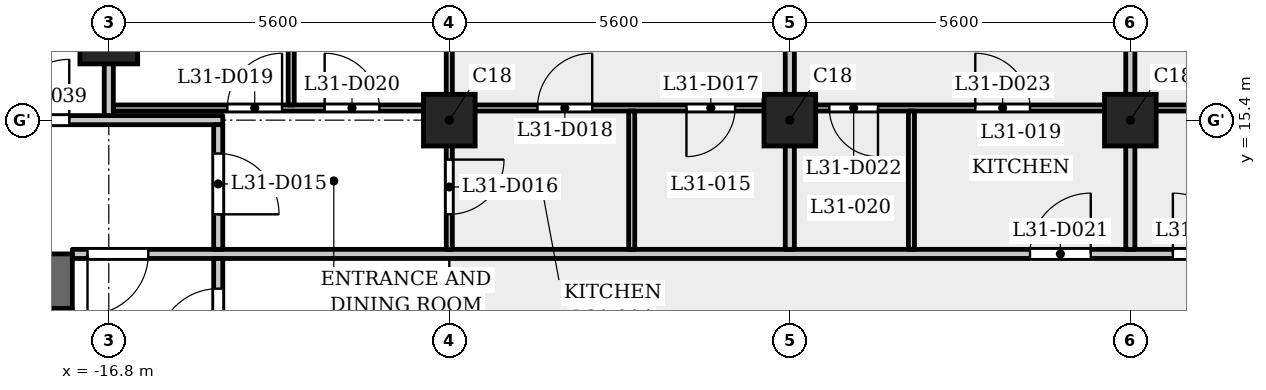
"""IFC4 building model, lengths in metres.
Left out: names, types, materials, properties, quantities, classifications, styles, units other than length and angle.
Written with IfcOpenShell. Run it as: python <this file> out.ifc"""

import sys

from ifc_helpers import new_model, si_unit, direction, frame, frame_2d, origin, origin_2d, place, context, subcontext, project, spatial, rectangle, extrude, element, fill, save


model = new_model("IFC4")
c1 = context("Model", 3, precision=1e-05, world=origin(), true_north=direction((0.0, 1.0)))
c2 = subcontext(c1, "Body", "Model", "MODEL_VIEW")
j1 = project(units=[si_unit("LENGTHUNIT", "METRE"), si_unit("PLANEANGLEUNIT", "RADIAN")], contexts=[c1])
p1 = place(None, origin())
s1 = spatial("IfcSite", under=j1, at=p1, CompositionType="ELEMENT")
p2 = place(p1, origin())
s2 = spatial("IfcBuilding", under=s1, at=p2, CompositionType="ELEMENT")
p3 = place(p2, frame((0.0, 0.0, 121.8)))
s3 = spatial("IfcBuildingStorey", under=s2, at=p3, CompositionType="ELEMENT", Elevation=121.8)
p4 = place(p3, frame((-16.8, 16.8, 0.0), z_axis=(0.0, 0.0, 1.0), x_axis=(1.0, 0.0, 0.0)))
e1 = element("IfcColumn", 1, at=p4, inside=s3, PredefinedType="COLUMN", context=c2, shape_type="SweptSolid", body=[
    extrude(rectangle(XDim=0.95, YDim=0.95, at=origin_2d()), origin(), (0.0, 0.0, 1.0), 3.5),
])
for number, where, z_axis, x_axis in (
    (2, (-11.2, 15.4, 0.0), (0.0, 0.0, 1.0), (1.0, 0.0, 0.0)),
    (3, (-5.6, 15.4, 0.0), (0.0, 0.0, 1.0), (1.0, 0.0, 0.0)),
    (4, (0.0, 15.4, 0.0), (0.0, 0.0, 1.0), (1.0, 0.0, 0.0)),
):
    element("IfcColumn", number, at=place(p3, frame(where, z_axis=z_axis, x_axis=x_axis)), inside=s3, PredefinedType="COLUMN", context=c2, shape_type="SweptSolid", body=[
        extrude(rectangle(XDim=0.85, YDim=0.85, at=origin_2d()), origin(), (0.0, 0.0, 1.0), 3.5),
    ])
p5 = place(p3, frame((-17.4, 12.75, 0.0), z_axis=(0.0, 0.0, 1.0), x_axis=(-1.0, 0.0, 0.0)))
e5 = element("IfcWall", 5, at=p5, inside=s3, PredefinedType="SHEAR", context=c2, shape_type="SweptSolid", body=[
    extrude(rectangle(XDim=10.4, YDim=0.9, at=frame_2d((5.2, 0.0))), origin(), (0.0, 0.0, 1.0), 3.15),
])
p6 = place(p3, frame((-17.6, -12.3, 0.0), z_axis=(0.0, 0.0, 1.0), x_axis=(0.0, 1.0, 0.0)))
e6 = element("IfcWall", 6, at=p6, inside=s3, PredefinedType="SHEAR", context=c2, shape_type="SweptSolid", body=[
    extrude(rectangle(XDim=24.6, YDim=0.4, at=frame_2d((12.3, 0.0))), origin(), (0.0, 0.0, 1.0), 3.15),
])
p7 = place(p6, frame((6.0, 0.0, 0.0)))
e7 = element("IfcOpeningElement", 7, at=p7, cuts=e6, PredefinedType="OPENING", context=c2, shape_type="SweptSolid", body=[
    extrude(rectangle(XDim=1.1, YDim=2.1, at=frame_2d((0.55, 1.05))), frame((0.0, 0.21, 0.0), z_axis=(0.0, -1.0, 0.0), x_axis=(1.0, 0.0, 0.0)), (0.0, 0.0, 1.0), 0.42),
])
p8 = place(p6, frame((8.4, 0.0, 0.0)))
e8 = element("IfcOpeningElement", 8, at=p8, cuts=e6, PredefinedType="OPENING", context=c2, shape_type="SweptSolid", body=[
    extrude(rectangle(XDim=1.1, YDim=2.1, at=frame_2d((0.55, 1.05))), frame((0.0, 0.21, 0.0), z_axis=(0.0, -1.0, 0.0), x_axis=(1.0, 0.0, 0.0)), (0.0, 0.0, 1.0), 0.42),
])
p9 = place(p6, frame((10.8, 0.0, 0.0)))
e9 = element("IfcOpeningElement", 9, at=p9, cuts=e6, PredefinedType="OPENING", context=c2, shape_type="SweptSolid", body=[
    extrude(rectangle(XDim=1.1, YDim=2.1, at=frame_2d((0.55, 1.05))), frame((0.0, 0.21, 0.0), z_axis=(0.0, -1.0, 0.0), x_axis=(1.0, 0.0, 0.0)), (0.0, 0.0, 1.0), 0.42),
])
p10 = place(p6, frame((22.8, 0.0, 0.0)))
e10 = element("IfcOpeningElement", 10, at=p10, cuts=e6, PredefinedType="OPENING", context=c2, shape_type="SweptSolid", body=[
    extrude(rectangle(XDim=1.1, YDim=2.1, at=frame_2d((0.55, 1.05))), frame((0.0, 0.21, 0.0), z_axis=(0.0, -1.0, 0.0), x_axis=(1.0, 0.0, 0.0)), (0.0, 0.0, 1.0), 0.42),
])
p11 = place(p6, frame((0.7, 0.0, 0.0)))
e11 = element("IfcOpeningElement", 11, at=p11, cuts=e6, PredefinedType="OPENING", context=c2, shape_type="SweptSolid", body=[
    extrude(rectangle(XDim=1.1, YDim=2.1, at=frame_2d((0.55, 1.05))), frame((0.0, 0.21, 0.0), z_axis=(0.0, -1.0, 0.0), x_axis=(1.0, 0.0, 0.0)), (0.0, 0.0, 1.0), 0.42),
])
p12 = place(p6, frame((12.775, 0.0, 0.0)))
e12 = element("IfcOpeningElement", 12, at=p12, cuts=e6, PredefinedType="OPENING", context=c2, shape_type="SweptSolid", body=[
    extrude(rectangle(XDim=1.8, YDim=2.1, at=frame_2d((0.9, 1.05))), frame((0.0, 0.21, 0.0), z_axis=(0.0, -1.0, 0.0), x_axis=(1.0, 0.0, 0.0)), (0.0, 0.0, 1.0), 0.42),
])
p13 = place(p3, frame((-17.4, 13.2, 0.0), z_axis=(0.0, 0.0, 1.0), x_axis=(1.0, 0.0, 0.0)))
e13 = element("IfcWall", 13, at=p13, inside=s3, PredefinedType="PARTITIONING", context=c2, shape_type="SweptSolid", body=[
    extrude(rectangle(XDim=34.8, YDim=0.15, at=frame_2d((17.4, 0.0))), origin(), (0.0, 0.0, 1.0), 3.15),
])
p14 = place(p13, frame((0.25, 0.0, 0.0)))
e14 = element("IfcOpeningElement", 14, at=p14, cuts=e13, PredefinedType="OPENING", context=c2, shape_type="SweptSolid", body=[
    extrude(rectangle(XDim=1.0, YDim=2.1, at=frame_2d((0.5, 1.05))), frame((0.0, 0.085, 0.0), z_axis=(0.0, -1.0, 0.0), x_axis=(1.0, 0.0, 0.0)), (0.0, 0.0, 1.0), 0.17),
])
p15 = place(p13, frame((33.65, 0.0, 0.0)))
e15 = element("IfcOpeningElement", 15, at=p15, cuts=e13, PredefinedType="OPENING", context=c2, shape_type="SweptSolid", body=[
    extrude(rectangle(XDim=1.0, YDim=2.1, at=frame_2d((0.5, 1.05))), frame((0.0, 0.085, 0.0), z_axis=(0.0, -1.0, 0.0), x_axis=(1.0, 0.0, 0.0)), (0.0, 0.0, 1.0), 0.17),
])
p16 = place(p13, frame((15.75, 0.0, 0.0)))
e16 = element("IfcOpeningElement", 16, at=p16, cuts=e13, PredefinedType="OPENING", context=c2, shape_type="SweptSolid", body=[
    extrude(rectangle(XDim=1.0, YDim=2.1, at=frame_2d((0.5, 1.05))), frame((0.0, 0.085, 0.0), z_axis=(0.0, -1.0, 0.0), x_axis=(1.0, 0.0, 0.0)), (0.0, 0.0, 1.0), 0.17),
])
p17 = place(p13, frame((18.1, 0.0, 0.0)))
e17 = element("IfcOpeningElement", 17, at=p17, cuts=e13, PredefinedType="OPENING", context=c2, shape_type="SweptSolid", body=[
    extrude(rectangle(XDim=1.0, YDim=2.1, at=frame_2d((0.5, 1.05))), frame((0.0, 0.085, 0.0), z_axis=(0.0, -1.0, 0.0), x_axis=(1.0, 0.0, 0.0)), (0.0, 0.0, 1.0), 0.17),
])
p18 = place(p13, frame((23.55, 0.0, 0.0)))
e18 = element("IfcOpeningElement", 18, at=p18, cuts=e13, PredefinedType="OPENING", context=c2, shape_type="SweptSolid", body=[
    extrude(rectangle(XDim=1.0, YDim=2.1, at=frame_2d((0.5, 1.05))), frame((0.0, 0.085, 0.0), z_axis=(0.0, -1.0, 0.0), x_axis=(1.0, 0.0, 0.0)), (0.0, 0.0, 1.0), 0.17),
])
p19 = place(p3, frame((-27.484, 15.4, 0.0), z_axis=(0.0, 0.0, 1.0), x_axis=(1.0, 0.0, 0.0)))
e19 = element("IfcWall", 19, at=p19, inside=s3, PredefinedType="PARTITIONING", context=c2, shape_type="SweptSolid", body=[
    extrude(rectangle(XDim=12.559, YDim=0.15, at=frame_2d((6.279, 0.0))), origin(), (0.0, 0.0, 1.0), 3.15),
])
p20 = place(p19, frame((9.034, 0.0, 0.0)))
e20 = element("IfcOpeningElement", 20, at=p20, cuts=e19, PredefinedType="OPENING", context=c2, shape_type="SweptSolid", body=[
    extrude(rectangle(XDim=1.0, YDim=2.1, at=frame_2d((0.5, 1.05))), frame((0.0, 0.085, 0.0), z_axis=(0.0, -1.0, 0.0), x_axis=(1.0, 0.0, 0.0)), (0.0, 0.0, 1.0), 0.17),
])
p21 = place(p3, frame((-16.725, 15.6, 0.0), z_axis=(0.0, 0.0, 1.0), x_axis=(1.0, 0.0, 0.0)))
e21 = element("IfcWall", 21, at=p21, inside=s3, PredefinedType="PARTITIONING", context=c2, shape_type="SweptSolid", body=[
    extrude(rectangle(XDim=33.45, YDim=0.1, at=frame_2d((16.725, 0.0))), origin(), (0.0, 0.0, 1.0), 3.15),
])
p22 = place(p21, frame((9.425, 0.0, 0.0)))
e22 = element("IfcOpeningElement", 22, at=p22, cuts=e21, PredefinedType="OPENING", context=c2, shape_type="SweptSolid", body=[
    extrude(rectangle(XDim=0.8, YDim=2.1, at=frame_2d((0.4, 1.05))), frame((0.0, 0.06, 0.0), z_axis=(0.0, -1.0, 0.0), x_axis=(1.0, 0.0, 0.0)), (0.0, 0.0, 1.0), 0.12),
])
p23 = place(p21, frame((6.975, 0.0, 0.0)))
e23 = element("IfcOpeningElement", 23, at=p23, cuts=e21, PredefinedType="OPENING", context=c2, shape_type="SweptSolid", body=[
    extrude(rectangle(XDim=0.9, YDim=2.1, at=frame_2d((0.45, 1.05))), frame((0.0, 0.06, 0.0), z_axis=(0.0, -1.0, 0.0), x_axis=(1.0, 0.0, 0.0)), (0.0, 0.0, 1.0), 0.12),
])
p24 = place(p21, frame((1.875, 0.0, 0.0)))
e24 = element("IfcOpeningElement", 24, at=p24, cuts=e21, PredefinedType="OPENING", context=c2, shape_type="SweptSolid", body=[
    extrude(rectangle(XDim=0.9, YDim=2.1, at=frame_2d((0.45, 1.05))), frame((0.0, 0.06, 0.0), z_axis=(0.0, -1.0, 0.0), x_axis=(1.0, 0.0, 0.0)), (0.0, 0.0, 1.0), 0.12),
])
p25 = place(p21, frame((3.475, 0.0, 0.0)))
e25 = element("IfcOpeningElement", 25, at=p25, cuts=e21, PredefinedType="OPENING", context=c2, shape_type="SweptSolid", body=[
    extrude(rectangle(XDim=0.9, YDim=2.1, at=frame_2d((0.45, 1.05))), frame((0.0, 0.06, 0.0), z_axis=(0.0, -1.0, 0.0), x_axis=(1.0, 0.0, 0.0)), (0.0, 0.0, 1.0), 0.12),
])
p26 = place(p21, frame((11.775, 0.0, 0.0)))
e26 = element("IfcOpeningElement", 26, at=p26, cuts=e21, PredefinedType="OPENING", context=c2, shape_type="SweptSolid", body=[
    extrude(rectangle(XDim=0.8, YDim=2.1, at=frame_2d((0.4, 1.05))), frame((0.0, 0.06, 0.0), z_axis=(0.0, -1.0, 0.0), x_axis=(1.0, 0.0, 0.0)), (0.0, 0.0, 1.0), 0.12),
])
p27 = place(p21, frame((14.175, 0.0, 0.0)))
e27 = element("IfcOpeningElement", 27, at=p27, cuts=e21, PredefinedType="OPENING", context=c2, shape_type="SweptSolid", body=[
    extrude(rectangle(XDim=0.9, YDim=2.1, at=frame_2d((0.45, 1.05))), frame((0.0, 0.06, 0.0), z_axis=(0.0, -1.0, 0.0), x_axis=(1.0, 0.0, 0.0)), (0.0, 0.0, 1.0), 0.12),
])
p28 = place(p21, frame((20.725, 0.0, 0.0)))
e28 = element("IfcOpeningElement", 28, at=p28, cuts=e21, PredefinedType="OPENING", context=c2, shape_type="SweptSolid", body=[
    extrude(rectangle(XDim=0.8, YDim=2.1, at=frame_2d((0.4, 1.05))), frame((0.0, 0.06, 0.0), z_axis=(0.0, -1.0, 0.0), x_axis=(1.0, 0.0, 0.0)), (0.0, 0.0, 1.0), 0.12),
])
p29 = place(p21, frame((18.375, 0.0, 0.0)))
e29 = element("IfcOpeningElement", 29, at=p29, cuts=e21, PredefinedType="OPENING", context=c2, shape_type="SweptSolid", body=[
    extrude(rectangle(XDim=0.9, YDim=2.1, at=frame_2d((0.45, 1.05))), frame((0.0, 0.06, 0.0), z_axis=(0.0, -1.0, 0.0), x_axis=(1.0, 0.0, 0.0)), (0.0, 0.0, 1.0), 0.12),
])
p30 = place(p21, frame((26.425, 0.0, 0.0)))
e30 = element("IfcOpeningElement", 30, at=p30, cuts=e21, PredefinedType="OPENING", context=c2, shape_type="SweptSolid", body=[
    extrude(rectangle(XDim=0.8, YDim=2.1, at=frame_2d((0.4, 1.05))), frame((0.0, 0.06, 0.0), z_axis=(0.0, -1.0, 0.0), x_axis=(1.0, 0.0, 0.0)), (0.0, 0.0, 1.0), 0.12),
])
p31 = place(p21, frame((23.875, 0.0, 0.0)))
e31 = element("IfcOpeningElement", 31, at=p31, cuts=e21, PredefinedType="OPENING", context=c2, shape_type="SweptSolid", body=[
    extrude(rectangle(XDim=0.9, YDim=2.1, at=frame_2d((0.45, 1.05))), frame((0.0, 0.06, 0.0), z_axis=(0.0, -1.0, 0.0), x_axis=(1.0, 0.0, 0.0)), (0.0, 0.0, 1.0), 0.12),
])
p32 = place(p21, frame((28.575, 0.0, 0.0)))
e32 = element("IfcOpeningElement", 32, at=p32, cuts=e21, PredefinedType="OPENING", context=c2, shape_type="SweptSolid", body=[
    extrude(rectangle(XDim=0.8, YDim=2.1, at=frame_2d((0.4, 1.05))), frame((0.0, 0.06, 0.0), z_axis=(0.0, -1.0, 0.0), x_axis=(1.0, 0.0, 0.0)), (0.0, 0.0, 1.0), 0.12),
])
p33 = place(p21, frame((30.725, 0.0, 0.0)))
e33 = element("IfcOpeningElement", 33, at=p33, cuts=e21, PredefinedType="OPENING", context=c2, shape_type="SweptSolid", body=[
    extrude(rectangle(XDim=0.9, YDim=2.1, at=frame_2d((0.45, 1.05))), frame((0.0, 0.06, 0.0), z_axis=(0.0, -1.0, 0.0), x_axis=(1.0, 0.0, 0.0)), (0.0, 0.0, 1.0), 0.12),
])
p34 = place(p3, frame((-16.8, 15.475, 0.0), z_axis=(0.0, 0.0, 1.0), x_axis=(0.0, 1.0, 0.0)))
e34 = element("IfcWall", 34, at=p34, inside=s3, PredefinedType="PARTITIONING", context=c2, shape_type="SweptSolid", body=[
    extrude(rectangle(XDim=7.505, YDim=0.15, at=frame_2d((3.752, 0.0))), origin(), (0.0, 0.0, 1.0), 3.15),
])
p35 = place(p3, frame((-15.0, 6.769, 0.0), z_axis=(0.0, 0.0, 1.0), x_axis=(0.0, 1.0, 0.0)))
e35 = element("IfcWall", 35, at=p35, inside=s3, PredefinedType="PARTITIONING", context=c2, shape_type="SweptSolid", body=[
    extrude(rectangle(XDim=6.356, YDim=0.15, at=frame_2d((3.178, 0.0))), origin(), (0.0, 0.0, 1.0), 3.15),
])
p36 = place(p35, frame((4.86, 0.0, 0.0)))
e36 = element("IfcOpeningElement", 36, at=p36, cuts=e35, PredefinedType="OPENING", context=c2, shape_type="SweptSolid", body=[
    extrude(rectangle(XDim=1.0, YDim=2.1, at=frame_2d((0.5, 1.05))), frame((0.0, 0.085, 0.0), z_axis=(0.0, -1.0, 0.0), x_axis=(1.0, 0.0, 0.0)), (0.0, 0.0, 1.0), 0.17),
])
p37 = place(p3, frame((-15.0, 13.275, 0.0), z_axis=(0.0, 0.0, 1.0), x_axis=(0.0, 1.0, 0.0)))
e37 = element("IfcWall", 37, at=p37, inside=s3, PredefinedType="PARTITIONING", context=c2, shape_type="SweptSolid", body=[
    extrude(rectangle(XDim=2.05, YDim=0.15, at=frame_2d((1.025, 0.0))), origin(), (0.0, 0.0, 1.0), 3.15),
])
p38 = place(p37, frame((0.576, 0.0, 0.0)))
e38 = element("IfcOpeningElement", 38, at=p38, cuts=e37, PredefinedType="OPENING", context=c2, shape_type="SweptSolid", body=[
    extrude(rectangle(XDim=1.0, YDim=2.1, at=frame_2d((0.5, 1.05))), frame((0.0, 0.085, 0.0), z_axis=(0.0, -1.0, 0.0), x_axis=(1.0, 0.0, 0.0)), (0.0, 0.0, 1.0), 0.17),
])
p39 = place(p3, frame((-13.8, 15.65, 0.0), z_axis=(0.0, 0.0, 1.0), x_axis=(0.0, 1.0, 0.0)))
e39 = element("IfcWall", 39, at=p39, inside=s3, PredefinedType="PARTITIONING", context=c2, shape_type="SweptSolid", body=[
    extrude(rectangle(XDim=6.43, YDim=0.1, at=frame_2d((3.215, 0.0))), origin(), (0.0, 0.0, 1.0), 3.15),
])
p40 = place(p3, frame((-11.2, 13.275, 0.0), z_axis=(0.0, 0.0, 1.0), x_axis=(0.0, 1.0, 0.0)))
e40 = element("IfcWall", 40, at=p40, inside=s3, PredefinedType="PARTITIONING", context=c2, shape_type="SweptSolid", body=[
    extrude(rectangle(XDim=2.275, YDim=0.1, at=frame_2d((1.138, 0.0))), origin(), (0.0, 0.0, 1.0), 3.15),
])
p41 = place(p40, frame((0.576, 0.0, 0.0)))
e41 = element("IfcOpeningElement", 41, at=p41, cuts=e40, PredefinedType="OPENING", context=c2, shape_type="SweptSolid", body=[
    extrude(rectangle(XDim=0.9, YDim=2.1, at=frame_2d((0.45, 1.05))), frame((0.0, 0.06, 0.0), z_axis=(0.0, -1.0, 0.0), x_axis=(1.0, 0.0, 0.0)), (0.0, 0.0, 1.0), 0.12),
])
p42 = place(p3, frame((-11.2, 15.65, 0.0), z_axis=(0.0, 0.0, 1.0), x_axis=(0.0, 1.0, 0.0)))
e42 = element("IfcWall", 42, at=p42, inside=s3, PredefinedType="PARTITIONING", context=c2, shape_type="SweptSolid", body=[
    extrude(rectangle(XDim=7.33, YDim=0.1, at=frame_2d((3.665, 0.0))), origin(), (0.0, 0.0, 1.0), 3.15),
])
p43 = place(p3, frame((-8.2, 13.275, 0.0), z_axis=(0.0, 0.0, 1.0), x_axis=(0.0, 1.0, 0.0)))
e43 = element("IfcWall", 43, at=p43, inside=s3, PredefinedType="PARTITIONING", context=c2, shape_type="SweptSolid", body=[
    extrude(rectangle(XDim=2.275, YDim=0.1, at=frame_2d((1.138, 0.0))), origin(), (0.0, 0.0, 1.0), 3.15),
])
p44 = place(p3, frame((-5.6, 13.275, 0.0), z_axis=(0.0, 0.0, 1.0), x_axis=(0.0, 1.0, 0.0)))
e44 = element("IfcWall", 44, at=p44, inside=s3, PredefinedType="PARTITIONING", context=c2, shape_type="SweptSolid", body=[
    extrude(rectangle(XDim=2.275, YDim=0.15, at=frame_2d((1.138, 0.0))), origin(), (0.0, 0.0, 1.0), 3.15),
])
p45 = place(p3, frame((-5.6, 15.65, 0.0), z_axis=(0.0, 0.0, 1.0), x_axis=(0.0, 1.0, 0.0)))
e45 = element("IfcWall", 45, at=p45, inside=s3, PredefinedType="PARTITIONING", context=c2, shape_type="SweptSolid", body=[
    extrude(rectangle(XDim=7.33, YDim=0.15, at=frame_2d((3.665, 0.0))), origin(), (0.0, 0.0, 1.0), 3.15),
])
p46 = place(p3, frame((-3.6, 13.275, 0.0), z_axis=(0.0, 0.0, 1.0), x_axis=(0.0, 1.0, 0.0)))
e46 = element("IfcWall", 46, at=p46, inside=s3, PredefinedType="PARTITIONING", context=c2, shape_type="SweptSolid", body=[
    extrude(rectangle(XDim=2.275, YDim=0.1, at=frame_2d((1.138, 0.0))), origin(), (0.0, 0.0, 1.0), 3.15),
])
p47 = place(p3, frame((0.0, 13.275, 0.0), z_axis=(0.0, 0.0, 1.0), x_axis=(0.0, 1.0, 0.0)))
e47 = element("IfcWall", 47, at=p47, inside=s3, PredefinedType="PARTITIONING", context=c2, shape_type="SweptSolid", body=[
    extrude(rectangle(XDim=2.275, YDim=0.15, at=frame_2d((1.138, 0.0))), origin(), (0.0, 0.0, 1.0), 3.15),
])
p48 = place(p3, frame((0.0, 15.65, 0.0), z_axis=(0.0, 0.0, 1.0), x_axis=(0.0, 1.0, 0.0)))
e48 = element("IfcWall", 48, at=p48, inside=s3, PredefinedType="PARTITIONING", context=c2, shape_type="SweptSolid", body=[
    extrude(rectangle(XDim=7.33, YDim=0.15, at=frame_2d((3.665, 0.0))), origin(), (0.0, 0.0, 1.0), 3.15),
])
p49 = place(p36, origin())
e49 = element("IfcDoor", 49, at=p49, inside=s3, OperationType="SINGLE_SWING_RIGHT", PredefinedType="DOOR", context=c2, shape_type="SweptSolid", body=[
    extrude(rectangle(XDim=1.0, YDim=2.1, at=frame_2d((0.5, 1.05))), frame((0.0, 0.025, 0.0), z_axis=(0.0, -1.0, 0.0), x_axis=(1.0, 0.0, 0.0)), (0.0, 0.0, 1.0), 0.05),
])
fill(e36, e49)
p50 = place(p14, origin())
e50 = element("IfcDoor", 50, at=p50, inside=s3, OperationType="SINGLE_SWING_LEFT", PredefinedType="DOOR", context=c2, shape_type="SweptSolid", body=[
    extrude(rectangle(XDim=1.0, YDim=2.1, at=frame_2d((0.5, 1.05))), frame((0.0, 0.025, 0.0), z_axis=(0.0, -1.0, 0.0), x_axis=(1.0, 0.0, 0.0)), (0.0, 0.0, 1.0), 0.05),
])
fill(e14, e50)
p51 = place(p38, origin())
e51 = element("IfcDoor", 51, at=p51, inside=s3, OperationType="SINGLE_SWING_LEFT", PredefinedType="DOOR", context=c2, shape_type="SweptSolid", body=[
    extrude(rectangle(XDim=1.0, YDim=2.1, at=frame_2d((0.5, 1.05))), frame((0.0, 0.025, 0.0), z_axis=(0.0, -1.0, 0.0), x_axis=(1.0, 0.0, 0.0)), (0.0, 0.0, 1.0), 0.05),
])
fill(e38, e51)
p52 = place(p41, origin())
e52 = element("IfcDoor", 52, at=p52, inside=s3, OperationType="SINGLE_SWING_RIGHT", PredefinedType="DOOR", context=c2, shape_type="SweptSolid", body=[
    extrude(rectangle(XDim=0.9, YDim=2.1, at=frame_2d((0.45, 1.05))), frame((0.0, 0.025, 0.0), z_axis=(0.0, -1.0, 0.0), x_axis=(1.0, 0.0, 0.0)), (0.0, 0.0, 1.0), 0.05),
])
fill(e41, e52)
p53 = place(p22, origin())
e53 = element("IfcDoor", 53, at=p53, inside=s3, OperationType="SINGLE_SWING_LEFT", PredefinedType="DOOR", context=c2, shape_type="SweptSolid", body=[
    extrude(rectangle(XDim=0.8, YDim=2.1, at=frame_2d((0.4, 1.05))), frame((0.0, 0.025, 0.0), z_axis=(0.0, -1.0, 0.0), x_axis=(1.0, 0.0, 0.0)), (0.0, 0.0, 1.0), 0.05),
])
fill(e22, e53)
p54 = place(p23, origin())
e54 = element("IfcDoor", 54, at=p54, inside=s3, OperationType="SINGLE_SWING_LEFT", PredefinedType="DOOR", context=c2, shape_type="SweptSolid", body=[
    extrude(rectangle(XDim=0.9, YDim=2.1, at=frame_2d((0.45, 1.05))), frame((0.0, 0.025, 0.0), z_axis=(0.0, -1.0, 0.0), x_axis=(1.0, 0.0, 0.0)), (0.0, 0.0, 1.0), 0.05),
])
fill(e23, e54)
p55 = place(p24, origin())
e55 = element("IfcDoor", 55, at=p55, inside=s3, OperationType="SINGLE_SWING_LEFT", PredefinedType="DOOR", context=c2, shape_type="SweptSolid", body=[
    extrude(rectangle(XDim=0.9, YDim=2.1, at=frame_2d((0.45, 1.05))), frame((0.0, 0.025, 0.0), z_axis=(0.0, -1.0, 0.0), x_axis=(1.0, 0.0, 0.0)), (0.0, 0.0, 1.0), 0.05),
])
fill(e24, e55)
p56 = place(p25, origin())
e56 = element("IfcDoor", 56, at=p56, inside=s3, OperationType="SINGLE_SWING_RIGHT", PredefinedType="DOOR", context=c2, shape_type="SweptSolid", body=[
    extrude(rectangle(XDim=0.9, YDim=2.1, at=frame_2d((0.45, 1.05))), frame((0.0, 0.025, 0.0), z_axis=(0.0, -1.0, 0.0), x_axis=(1.0, 0.0, 0.0)), (0.0, 0.0, 1.0), 0.05),
])
fill(e25, e56)
p57 = place(p16, origin())
e57 = element("IfcDoor", 57, at=p57, inside=s3, OperationType="SINGLE_SWING_LEFT", PredefinedType="DOOR", context=c2, shape_type="SweptSolid", body=[
    extrude(rectangle(XDim=1.0, YDim=2.1, at=frame_2d((0.5, 1.05))), frame((0.0, 0.025, 0.0), z_axis=(0.0, -1.0, 0.0), x_axis=(1.0, 0.0, 0.0)), (0.0, 0.0, 1.0), 0.05),
])
fill(e16, e57)
p58 = place(p26, origin())
e58 = element("IfcDoor", 58, at=p58, inside=s3, OperationType="SINGLE_SWING_RIGHT", PredefinedType="DOOR", context=c2, shape_type="SweptSolid", body=[
    extrude(rectangle(XDim=0.8, YDim=2.1, at=frame_2d((0.4, 1.05))), frame((0.0, 0.025, 0.0), z_axis=(0.0, -1.0, 0.0), x_axis=(1.0, 0.0, 0.0)), (0.0, 0.0, 1.0), 0.05),
])
fill(e26, e58)
p59 = place(p27, origin())
e59 = element("IfcDoor", 59, at=p59, inside=s3, OperationType="SINGLE_SWING_RIGHT", PredefinedType="DOOR", context=c2, shape_type="SweptSolid", body=[
    extrude(rectangle(XDim=0.9, YDim=2.1, at=frame_2d((0.45, 1.05))), frame((0.0, 0.025, 0.0), z_axis=(0.0, -1.0, 0.0), x_axis=(1.0, 0.0, 0.0)), (0.0, 0.0, 1.0), 0.05),
])
fill(e27, e59)
p60 = place(p17, origin())
e60 = element("IfcDoor", 60, at=p60, inside=s3, OperationType="SINGLE_SWING_RIGHT", PredefinedType="DOOR", context=c2, shape_type="SweptSolid", body=[
    extrude(rectangle(XDim=1.0, YDim=2.1, at=frame_2d((0.5, 1.05))), frame((0.0, 0.025, 0.0), z_axis=(0.0, -1.0, 0.0), x_axis=(1.0, 0.0, 0.0)), (0.0, 0.0, 1.0), 0.05),
])
fill(e17, e60)
p61 = place(p20, origin())
e61 = element("IfcDoor", 61, at=p61, inside=s3, OperationType="SINGLE_SWING_LEFT", PredefinedType="DOOR", context=c2, shape_type="SweptSolid", body=[
    extrude(rectangle(XDim=1.0, YDim=2.1, at=frame_2d((0.5, 1.05))), frame((0.0, 0.025, 0.0), z_axis=(0.0, -1.0, 0.0), x_axis=(1.0, 0.0, 0.0)), (0.0, 0.0, 1.0), 0.05),
])
fill(e20, e61)
save(model, sys.argv[1])
